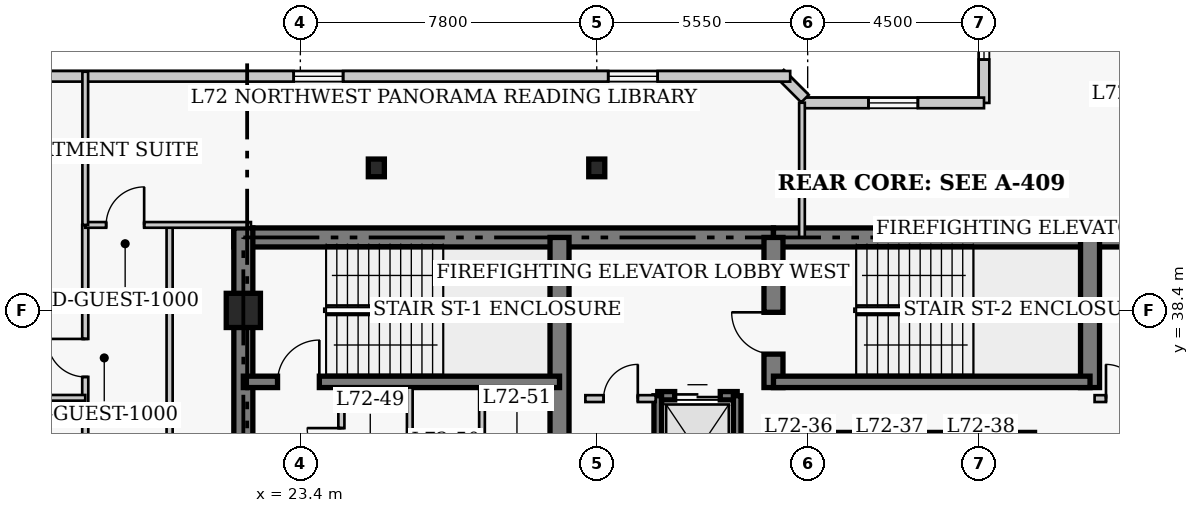
"""IFC4 building model, lengths in metres.
Left out: names, types, materials, properties, quantities, classifications, styles, units other than length and angle.
Written with IfcOpenShell. Run it as: python <this file> out.ifc"""

import sys

from ifc_helpers import new_model, si_unit, direction, frame, frame_2d, origin, origin_2d, place, context, subcontext, project, spatial, rectangle, i_section, extrude, element, fill, save


model = new_model("IFC4")
c1 = context("Model", 3, precision=1e-05, world=origin(), true_north=direction((0.0, 1.0)))
c2 = subcontext(c1, "Body", "Model", "MODEL_VIEW")
j1 = project(units=[si_unit("LENGTHUNIT", "METRE"), si_unit("PLANEANGLEUNIT", "RADIAN")], contexts=[c1])
p1 = place(None, origin())
s1 = spatial("IfcSite", under=j1, at=p1, CompositionType="ELEMENT")
p2 = place(p1, origin())
s2 = spatial("IfcBuilding", under=s1, at=p2, CompositionType="ELEMENT")
p3 = place(p2, frame((0.0, 0.0, 289.4)))
s3 = spatial("IfcBuildingStorey", under=s2, at=p3, CompositionType="ELEMENT", Elevation=289.4)
p4 = place(p3, frame((21.65, 40.32, 0.0), z_axis=(0.0, 0.0, 1.0), x_axis=(1.0, 0.0, 0.0)))
e1 = element("IfcWall", 1, at=p4, inside=s3, PredefinedType="SHEAR", context=c2, shape_type="SweptSolid", body=[
    extrude(rectangle(XDim=14.2, YDim=0.5, at=frame_2d((7.1, 0.0))), origin(), (0.0, 0.0, 1.0), 4.0),
])
p5 = place(p3, frame((35.85, 40.32, 0.0), z_axis=(0.0, 0.0, 1.0), x_axis=(1.0, 0.0, 0.0)))
e2 = element("IfcWall", 2, at=p5, inside=s3, PredefinedType="SHEAR", context=c2, shape_type="SweptSolid", body=[
    extrude(rectangle(XDim=12.6, YDim=0.5, at=frame_2d((6.3, 0.0))), origin(), (0.0, 0.0, 1.0), 4.0),
])
p6 = place(p3, frame((21.9, 27.05, 0.0), z_axis=(0.0, 0.0, 1.0), x_axis=(0.0, 1.0, 0.0)))
e3 = element("IfcWall", 3, at=p6, inside=s3, PredefinedType="SHEAR", context=c2, shape_type="SweptSolid", body=[
    extrude(rectangle(XDim=13.52, YDim=0.5, at=frame_2d((6.76, 0.0))), origin(), (0.0, 0.0, 1.0), 4.0),
])
p7 = place(p3, frame((30.22, 33.0, 0.0), z_axis=(0.0, 0.0, 1.0), x_axis=(0.0, 1.0, 0.0)))
e4 = element("IfcWall", 4, at=p7, inside=s3, PredefinedType="SHEAR", context=c2, shape_type="SweptSolid", body=[
    extrude(rectangle(XDim=7.32, YDim=0.5, at=frame_2d((3.66, 0.0))), origin(), (0.0, 0.0, 1.0), 4.0),
])
p8 = place(p3, frame((35.85, 36.37, 0.0), z_axis=(0.0, 0.0, 1.0), x_axis=(0.0, 1.0, 0.0)))
e5 = element("IfcWall", 5, at=p8, inside=s3, PredefinedType="SHEAR", context=c2, shape_type="SweptSolid", body=[
    extrude(rectangle(XDim=3.95, YDim=0.5, at=frame_2d((1.975, 0.0))), origin(), (0.0, 0.0, 1.0), 4.0),
])
p9 = place(p8, frame((0.88, 0.0, 0.0)))
e6 = element("IfcOpeningElement", 6, at=p9, cuts=e5, PredefinedType="OPENING", context=c2, shape_type="SweptSolid", body=[
    extrude(rectangle(XDim=1.1, YDim=2.15, at=frame_2d((0.55, 1.075))), frame((0.0, 0.26, 0.0), z_axis=(0.0, -1.0, 0.0), x_axis=(1.0, 0.0, 0.0)), (0.0, 0.0, 1.0), 0.52),
])
p10 = place(p3, frame((44.18, 36.37, 0.0), z_axis=(0.0, 0.0, 1.0), x_axis=(0.0, 1.0, 0.0)))
e7 = element("IfcWall", 7, at=p10, inside=s3, PredefinedType="SHEAR", context=c2, shape_type="SweptSolid", body=[
    extrude(rectangle(XDim=3.95, YDim=0.5, at=frame_2d((1.975, 0.0))), origin(), (0.0, 0.0, 1.0), 4.0),
])
p11 = place(p3, frame((21.9, 36.52, 0.0), z_axis=(0.0, 0.0, 1.0), x_axis=(1.0, 0.0, 0.0)))
e8 = element("IfcWall", 8, at=p11, inside=s3, PredefinedType="SHEAR", context=c2, shape_type="SweptSolid", body=[
    extrude(rectangle(XDim=8.32, YDim=0.3, at=frame_2d((4.16, 0.0))), origin(), (0.0, 0.0, 1.0), 4.0),
])
p12 = place(p11, frame((0.9, 0.0, 0.0)))
e9 = element("IfcOpeningElement", 9, at=p12, cuts=e8, PredefinedType="OPENING", context=c2, shape_type="SweptSolid", body=[
    extrude(rectangle(XDim=1.1, YDim=2.15, at=frame_2d((0.55, 1.075))), frame((0.0, 0.16, 0.0), z_axis=(0.0, -1.0, 0.0), x_axis=(1.0, 0.0, 0.0)), (0.0, 0.0, 1.0), 0.32),
])
p13 = place(p3, frame((35.85, 36.52, 0.0), z_axis=(0.0, 0.0, 1.0), x_axis=(1.0, 0.0, 0.0)))
e10 = element("IfcWall", 10, at=p13, inside=s3, PredefinedType="SHEAR", context=c2, shape_type="SweptSolid", body=[
    extrude(rectangle(XDim=8.33, YDim=0.3, at=frame_2d((4.165, 0.0))), origin(), (0.0, 0.0, 1.0), 4.0),
])
p14 = place(p3, frame((21.9, 38.4, 0.0), z_axis=(0.0, 0.0, 1.0), x_axis=(1.0, 0.0, 0.0)))
e11 = element("IfcColumn", 11, at=p14, inside=s3, PredefinedType="COLUMN", context=c2, shape_type="SweptSolid", body=[
    extrude(rectangle(XDim=0.9, YDim=0.9, at=origin_2d()), origin(), (0.0, 0.0, 1.0), 4.0),
])
for number, where, z_axis, x_axis in (
    (12, (25.4, 42.15, 0.0), (0.0, 0.0, 1.0), (1.0, 0.0, 0.0)),
    (13, (31.2, 42.15, 0.0), (0.0, 0.0, 1.0), (1.0, 0.0, 0.0)),
):
    element("IfcColumn", number, at=place(p3, frame(where, z_axis=z_axis, x_axis=x_axis)), inside=s3, PredefinedType="COLUMN", context=c2, shape_type="SweptSolid", body=[
        extrude(i_section(OverallWidth=0.422, OverallDepth=0.465, WebThickness=0.045, FlangeThickness=0.073, FilletRadius=0.017, at=origin_2d()), origin(), (0.0, 0.0, 1.0), 4.0),
    ])
p15 = place(p3, frame((41.39, 47.44, 0.0), z_axis=(0.0, 0.0, 1.0), x_axis=(0.0, -1.0, 0.0)))
e14 = element("IfcWall", 14, at=p15, inside=s3, PredefinedType="SOLIDWALL", context=c2, shape_type="SweptSolid", body=[
    extrude(rectangle(XDim=3.58, YDim=0.28, at=frame_2d((1.79, 0.0))), origin(), (0.0, 0.0, 1.0), 3.76),
])
p16 = place(p15, frame((1.14, 0.0, 0.85)))
e15 = element("IfcOpeningElement", 15, at=p16, cuts=e14, PredefinedType="OPENING", context=c2, shape_type="SweptSolid", body=[
    extrude(rectangle(XDim=1.3, YDim=1.7, at=frame_2d((0.65, 0.85))), frame((0.0, 0.15, 0.0), z_axis=(0.0, -1.0, 0.0), x_axis=(1.0, 0.0, 0.0)), (0.0, 0.0, 1.0), 0.3),
])
p17 = place(p3, frame((41.39, 43.86, 0.0), z_axis=(0.0, 0.0, 1.0), x_axis=(-1.0, 0.0, 0.0)))
e16 = element("IfcWall", 16, at=p17, inside=s3, PredefinedType="SOLIDWALL", context=c2, shape_type="SweptSolid", body=[
    extrude(rectangle(XDim=4.78, YDim=0.28, at=frame_2d((2.39, 0.0))), origin(), (0.0, 0.0, 1.0), 3.76),
])
p18 = place(p17, frame((1.74, 0.0, 0.85)))
e17 = element("IfcOpeningElement", 17, at=p18, cuts=e16, PredefinedType="OPENING", context=c2, shape_type="SweptSolid", body=[
    extrude(rectangle(XDim=1.3, YDim=1.7, at=frame_2d((0.65, 0.85))), frame((0.0, 0.15, 0.0), z_axis=(0.0, -1.0, 0.0), x_axis=(1.0, 0.0, 0.0)), (0.0, 0.0, 1.0), 0.3),
])
p19 = place(p3, frame((36.679, 43.973, 0.0), z_axis=(0.0, 0.0, 1.0), x_axis=(-0.706975312048, 0.707238225886, 0.0)))
e18 = element("IfcWall", 18, at=p19, inside=s3, PredefinedType="SOLIDWALL", context=c2, shape_type="SweptSolid", body=[
    extrude(rectangle(XDim=0.929, YDim=0.28, at=frame_2d((0.464, 0.0))), origin(), (0.0, 0.0, 1.0), 3.76),
])
p20 = place(p3, frame((36.29, 44.56, 0.0), z_axis=(0.0, 0.0, 1.0), x_axis=(-1.0, 0.0, 0.0)))
e19 = element("IfcWall", 19, at=p20, inside=s3, PredefinedType="SOLIDWALL", context=c2, shape_type="SweptSolid", body=[
    extrude(rectangle(XDim=24.83, YDim=0.28, at=frame_2d((12.415, 0.0))), origin(), (0.0, 0.0, 1.0), 3.76),
])
p21 = place(p20, frame((3.488, 0.0, 0.85)))
e20 = element("IfcOpeningElement", 20, at=p21, cuts=e19, PredefinedType="OPENING", context=c2, shape_type="SweptSolid", body=[
    extrude(rectangle(XDim=1.3, YDim=1.7, at=frame_2d((0.65, 0.85))), frame((0.0, 0.15, 0.0), z_axis=(0.0, -1.0, 0.0), x_axis=(1.0, 0.0, 0.0)), (0.0, 0.0, 1.0), 0.3),
])
p22 = place(p20, frame((11.765, 0.0, 0.85)))
e21 = element("IfcOpeningElement", 21, at=p22, cuts=e19, PredefinedType="OPENING", context=c2, shape_type="SweptSolid", body=[
    extrude(rectangle(XDim=1.3, YDim=1.7, at=frame_2d((0.65, 0.85))), frame((0.0, 0.15, 0.0), z_axis=(0.0, -1.0, 0.0), x_axis=(1.0, 0.0, 0.0)), (0.0, 0.0, 1.0), 0.3),
])
p23 = place(p20, frame((20.042, 0.0, 0.85)))
e22 = element("IfcOpeningElement", 22, at=p23, cuts=e19, PredefinedType="OPENING", context=c2, shape_type="SweptSolid", body=[
    extrude(rectangle(XDim=1.3, YDim=1.7, at=frame_2d((0.65, 0.85))), frame((0.0, 0.15, 0.0), z_axis=(0.0, -1.0, 0.0), x_axis=(1.0, 0.0, 0.0)), (0.0, 0.0, 1.0), 0.3),
])
p24 = place(p3, frame((35.68, 35.08, 0.0), z_axis=(0.0, 0.0, 1.0), x_axis=(1.0, 0.0, 0.0)))
e23 = element("IfcWall", 23, at=p24, inside=s3, PredefinedType="SHEAR", context=c2, shape_type="SweptSolid", body=[
    extrude(rectangle(XDim=2.32, YDim=0.22, at=frame_2d((1.16, 0.0))), origin(), (0.0, 0.0, 1.0), 4.0),
])
p25 = place(p3, frame((38.0, 35.08, 0.0), z_axis=(0.0, 0.0, 1.0), x_axis=(1.0, 0.0, 0.0)))
e24 = element("IfcWall", 24, at=p25, inside=s3, PredefinedType="SHEAR", context=c2, shape_type="SweptSolid", body=[
    extrude(rectangle(XDim=2.4, YDim=0.22, at=frame_2d((1.2, 0.0))), origin(), (0.0, 0.0, 1.0), 4.0),
])
p26 = place(p3, frame((40.4, 35.08, 0.0), z_axis=(0.0, 0.0, 1.0), x_axis=(1.0, 0.0, 0.0)))
e25 = element("IfcWall", 25, at=p26, inside=s3, PredefinedType="SHEAR", context=c2, shape_type="SweptSolid", body=[
    extrude(rectangle(XDim=2.32, YDim=0.22, at=frame_2d((1.16, 0.0))), origin(), (0.0, 0.0, 1.0), 4.0),
])
p27 = place(p3, frame((32.805, 36.155, 0.0), z_axis=(0.0, 0.0, 1.0), x_axis=(1.0, 0.0, 0.0)))
e26 = element("IfcWall", 26, at=p27, inside=s3, PredefinedType="SHEAR", context=c2, shape_type="SweptSolid", body=[
    extrude(rectangle(XDim=2.09, YDim=0.22, at=frame_2d((1.045, 0.0))), origin(), (0.0, 0.0, 1.0), 4.0),
])
p28 = place(p27, frame((0.445, 0.0, 0.0)))
e27 = element("IfcOpeningElement", 27, at=p28, cuts=e26, PredefinedType="OPENING", context=c2, shape_type="SweptSolid", body=[
    extrude(rectangle(XDim=1.2, YDim=2.15, at=frame_2d((0.6, 1.075))), frame((0.0, 0.12, 0.0), z_axis=(0.0, -1.0, 0.0), x_axis=(1.0, 0.0, 0.0)), (0.0, 0.0, 1.0), 0.24),
])
for number, where, z_axis, x_axis in (
    (28, (32.805, 33.245, 0.0), (0.0, 0.0, 1.0), (0.0, 1.0, 0.0)),
    (29, (34.895, 33.245, 0.0), (0.0, 0.0, 1.0), (0.0, 1.0, 0.0)),
):
    element("IfcWall", number, at=place(p3, frame(where, z_axis=z_axis, x_axis=x_axis)), inside=s3, PredefinedType="SHEAR", context=c2, shape_type="SweptSolid", body=[
        extrude(rectangle(XDim=2.91, YDim=0.2, at=frame_2d((1.455, 0.0))), origin(), (0.0, 0.0, 1.0), 4.0),
    ])
p29 = place(p3, frame((30.9, 36.08, 0.0), z_axis=(0.0, 0.0, 1.0), x_axis=(1.0, 0.0, 0.0)))
e30 = element("IfcWall", 30, at=p29, inside=s3, PredefinedType="PARTITIONING", context=c2, shape_type="SweptSolid", body=[
    extrude(rectangle(XDim=1.85, YDim=0.18, at=frame_2d((0.925, 0.0))), origin(), (0.0, 0.0, 1.0), 3.76),
])
p30 = place(p29, frame((0.48, 0.0, 0.0)))
e31 = element("IfcOpeningElement", 31, at=p30, cuts=e30, PredefinedType="OPENING", context=c2, shape_type="SweptSolid", body=[
    extrude(rectangle(XDim=0.9, YDim=2.15, at=frame_2d((0.45, 1.075))), frame((0.0, 0.1, 0.0), z_axis=(0.0, -1.0, 0.0), x_axis=(1.0, 0.0, 0.0)), (0.0, 0.0, 1.0), 0.2),
])
p31 = place(p3, frame((44.3, 36.08, 0.0), z_axis=(0.0, 0.0, 1.0), x_axis=(1.0, 0.0, 0.0)))
e32 = element("IfcWall", 32, at=p31, inside=s3, PredefinedType="PARTITIONING", context=c2, shape_type="SweptSolid", body=[
    extrude(rectangle(XDim=1.5, YDim=0.18, at=frame_2d((0.75, 0.0))), origin(), (0.0, 0.0, 1.0), 3.76),
])
p32 = place(p31, frame((0.3, 0.0, 0.0)))
e33 = element("IfcOpeningElement", 33, at=p32, cuts=e32, PredefinedType="OPENING", context=c2, shape_type="SweptSolid", body=[
    extrude(rectangle(XDim=0.9, YDim=2.15, at=frame_2d((0.45, 1.075))), frame((0.0, 0.1, 0.0), z_axis=(0.0, -1.0, 0.0), x_axis=(1.0, 0.0, 0.0)), (0.0, 0.0, 1.0), 0.2),
])
p33 = place(p3, frame((24.48, 32.8, 0.0), z_axis=(0.0, 0.0, 1.0), x_axis=(0.0, 1.0, 0.0)))
e34 = element("IfcWall", 34, at=p33, inside=s3, PredefinedType="PARTITIONING", context=c2, shape_type="SweptSolid", body=[
    extrude(rectangle(XDim=3.57, YDim=0.16, at=frame_2d((1.785, 0.0))), origin(), (0.0, 0.0, 1.0), 3.76),
])
p34 = place(p33, frame((1.604, 0.0, 0.0)))
e35 = element("IfcOpeningElement", 35, at=p34, cuts=e34, PredefinedType="OPENING", context=c2, shape_type="SweptSolid", body=[
    extrude(rectangle(XDim=0.9, YDim=2.1, at=frame_2d((0.45, 1.05))), frame((0.0, 0.09, 0.0), z_axis=(0.0, -1.0, 0.0), x_axis=(1.0, 0.0, 0.0)), (0.0, 0.0, 1.0), 0.18),
])
for number, where, z_axis, x_axis in (
    (36, (26.28, 32.75, 0.0), (0.0, 0.0, 1.0), (0.0, 1.0, 0.0)),
    (37, (28.18, 32.75, 0.0), (0.0, 0.0, 1.0), (0.0, 1.0, 0.0)),
):
    element("IfcWall", number, at=place(p3, frame(where, z_axis=z_axis, x_axis=x_axis)), inside=s3, PredefinedType="PARTITIONING", context=c2, shape_type="SweptSolid", body=[
        extrude(rectangle(XDim=3.62, YDim=0.15, at=frame_2d((1.81, 0.0))), origin(), (0.0, 0.0, 1.0), 3.76),
    ])
p35 = place(p3, frame((17.74, 8.55, 0.0), z_axis=(0.0, 0.0, 1.0), x_axis=(0.0, 1.0, 0.0)))
e38 = element("IfcWall", 38, at=p35, inside=s3, PredefinedType="PARTITIONING", context=c2, shape_type="SweptSolid", body=[
    extrude(rectangle(XDim=32.1, YDim=0.16, at=frame_2d((16.05, 0.0))), origin(), (0.0, 0.0, 1.0), 3.76),
])
p36 = place(p35, frame((5.25, 0.0, 0.0)))
e39 = element("IfcOpeningElement", 39, at=p36, cuts=e38, PredefinedType="OPENING", context=c2, shape_type="SweptSolid", body=[
    extrude(rectangle(XDim=0.95, YDim=2.1, at=frame_2d((0.475, 1.05))), frame((0.0, 0.09, 0.0), z_axis=(0.0, -1.0, 0.0), x_axis=(1.0, 0.0, 0.0)), (0.0, 0.0, 1.0), 0.18),
])
p37 = place(p35, frame((15.375, 0.0, 0.0)))
e40 = element("IfcOpeningElement", 40, at=p37, cuts=e38, PredefinedType="OPENING", context=c2, shape_type="SweptSolid", body=[
    extrude(rectangle(XDim=0.95, YDim=2.1, at=frame_2d((0.475, 1.05))), frame((0.0, 0.09, 0.0), z_axis=(0.0, -1.0, 0.0), x_axis=(1.0, 0.0, 0.0)), (0.0, 0.0, 1.0), 0.18),
])
p38 = place(p35, frame((23.425, 0.0, 0.0)))
e41 = element("IfcOpeningElement", 41, at=p38, cuts=e38, PredefinedType="OPENING", context=c2, shape_type="SweptSolid", body=[
    extrude(rectangle(XDim=0.95, YDim=2.1, at=frame_2d((0.475, 1.05))), frame((0.0, 0.09, 0.0), z_axis=(0.0, -1.0, 0.0), x_axis=(1.0, 0.0, 0.0)), (0.0, 0.0, 1.0), 0.18),
])
p39 = place(p35, frame((28.1, 0.0, 0.0)))
e42 = element("IfcOpeningElement", 42, at=p39, cuts=e38, PredefinedType="OPENING", context=c2, shape_type="SweptSolid", body=[
    extrude(rectangle(XDim=1.0, YDim=2.15, at=frame_2d((0.5, 1.075))), frame((0.0, 0.09, 0.0), z_axis=(0.0, -1.0, 0.0), x_axis=(1.0, 0.0, 0.0)), (0.0, 0.0, 1.0), 0.18),
])
p40 = place(p3, frame((19.96, 35.02, 0.0), z_axis=(0.0, 0.0, 1.0), x_axis=(0.0, 1.0, 0.0)))
e43 = element("IfcWall", 43, at=p40, inside=s3, PredefinedType="PARTITIONING", context=c2, shape_type="SweptSolid", body=[
    extrude(rectangle(XDim=5.63, YDim=0.16, at=frame_2d((2.815, 0.0))), origin(), (0.0, 0.0, 1.0), 3.76),
])
p41 = place(p3, frame((17.74, 40.65, 0.0), z_axis=(0.0, 0.0, 1.0), x_axis=(1.0, 0.0, 0.0)))
e44 = element("IfcWall", 44, at=p41, inside=s3, PredefinedType="PARTITIONING", context=c2, shape_type="SweptSolid", body=[
    extrude(rectangle(XDim=4.36, YDim=0.15, at=frame_2d((2.18, 0.0))), origin(), (0.0, 0.0, 1.0), 3.76),
])
p42 = place(p41, frame((0.55, 0.0, 0.0)))
e45 = element("IfcOpeningElement", 45, at=p42, cuts=e44, PredefinedType="OPENING", context=c2, shape_type="SweptSolid", body=[
    extrude(rectangle(XDim=1.0, YDim=2.15, at=frame_2d((0.5, 1.075))), frame((0.0, 0.085, 0.0), z_axis=(0.0, -1.0, 0.0), x_axis=(1.0, 0.0, 0.0)), (0.0, 0.0, 1.0), 0.17),
])
p43 = place(p3, frame((17.74, 40.65, 0.0), z_axis=(0.0, 0.0, 1.0), x_axis=(0.0, 1.0, 0.0)))
e46 = element("IfcWall", 46, at=p43, inside=s3, PredefinedType="PARTITIONING", context=c2, shape_type="SweptSolid", body=[
    extrude(rectangle(XDim=4.03, YDim=0.15, at=frame_2d((2.015, 0.0))), origin(), (0.0, 0.0, 1.0), 3.76),
])
p44 = place(p3, frame((36.6, 40.32, 0.0), z_axis=(0.0, 0.0, 1.0), x_axis=(0.0, 1.0, 0.0)))
e47 = element("IfcWall", 47, at=p44, inside=s3, PredefinedType="PARTITIONING", context=c2, shape_type="SweptSolid", body=[
    extrude(rectangle(XDim=3.545, YDim=0.15, at=frame_2d((1.772, 0.0))), origin(), (0.0, 0.0, 1.0), 3.76),
])
p45 = place(p3, frame((14.45, 36.1, 0.0), z_axis=(0.0, 0.0, 1.0), x_axis=(1.0, 0.0, 0.0)))
e48 = element("IfcWall", 48, at=p45, inside=s3, PredefinedType="PARTITIONING", context=c2, shape_type="SweptSolid", body=[
    extrude(rectangle(XDim=3.29, YDim=0.15, at=frame_2d((1.645, 0.0))), origin(), (0.0, 0.0, 1.0), 3.76),
])
p46 = place(p16, origin())
e49 = element("IfcWindow", 49, at=p46, inside=s3, PartitioningType="SINGLE_PANEL", PredefinedType="WINDOW", context=c2, shape_type="SweptSolid", body=[
    extrude(rectangle(XDim=1.3, YDim=1.7, at=frame_2d((0.65, 0.85))), frame((0.0, 0.03, 0.0), z_axis=(0.0, -1.0, 0.0), x_axis=(1.0, 0.0, 0.0)), (0.0, 0.0, 1.0), 0.06),
])
fill(e15, e49)
p47 = place(p18, origin())
e50 = element("IfcWindow", 50, at=p47, inside=s3, PartitioningType="SINGLE_PANEL", PredefinedType="WINDOW", context=c2, shape_type="SweptSolid", body=[
    extrude(rectangle(XDim=1.3, YDim=1.7, at=frame_2d((0.65, 0.85))), frame((0.0, 0.03, 0.0), z_axis=(0.0, -1.0, 0.0), x_axis=(1.0, 0.0, 0.0)), (0.0, 0.0, 1.0), 0.06),
])
fill(e17, e50)
p48 = place(p21, origin())
e51 = element("IfcWindow", 51, at=p48, inside=s3, PartitioningType="SINGLE_PANEL", PredefinedType="WINDOW", context=c2, shape_type="SweptSolid", body=[
    extrude(rectangle(XDim=1.3, YDim=1.7, at=frame_2d((0.65, 0.85))), frame((0.0, 0.03, 0.0), z_axis=(0.0, -1.0, 0.0), x_axis=(1.0, 0.0, 0.0)), (0.0, 0.0, 1.0), 0.06),
])
fill(e20, e51)
p49 = place(p22, origin())
e52 = element("IfcWindow", 52, at=p49, inside=s3, PartitioningType="SINGLE_PANEL", PredefinedType="WINDOW", context=c2, shape_type="SweptSolid", body=[
    extrude(rectangle(XDim=1.3, YDim=1.7, at=frame_2d((0.65, 0.85))), frame((0.0, 0.03, 0.0), z_axis=(0.0, -1.0, 0.0), x_axis=(1.0, 0.0, 0.0)), (0.0, 0.0, 1.0), 0.06),
])
fill(e21, e52)
p50 = place(p28, origin())
e53 = element("IfcDoor", 53, at=p50, inside=s3, OperationType="DOUBLE_DOOR_SLIDING", PredefinedType="DOOR", context=c2, shape_type="SweptSolid", body=[
    extrude(rectangle(XDim=1.2, YDim=2.15, at=frame_2d((0.6, 1.075))), frame((0.0, 0.025, 0.0), z_axis=(0.0, -1.0, 0.0), x_axis=(1.0, 0.0, 0.0)), (0.0, 0.0, 1.0), 0.05),
])
fill(e27, e53)
p51 = place(p30, origin())
e54 = element("IfcDoor", 54, at=p51, inside=s3, OperationType="SINGLE_SWING_RIGHT", PredefinedType="DOOR", context=c2, shape_type="SweptSolid", body=[
    extrude(rectangle(XDim=0.9, YDim=2.15, at=frame_2d((0.45, 1.075))), frame((0.0, 0.025, 0.0), z_axis=(0.0, -1.0, 0.0), x_axis=(1.0, 0.0, 0.0)), (0.0, 0.0, 1.0), 0.05),
])
fill(e31, e54)
p52 = place(p32, origin())
e55 = element("IfcDoor", 55, at=p52, inside=s3, OperationType="SINGLE_SWING_LEFT", PredefinedType="DOOR", context=c2, shape_type="SweptSolid", body=[
    extrude(rectangle(XDim=0.9, YDim=2.15, at=frame_2d((0.45, 1.075))), frame((0.0, 0.025, 0.0), z_axis=(0.0, -1.0, 0.0), x_axis=(1.0, 0.0, 0.0)), (0.0, 0.0, 1.0), 0.05),
])
fill(e33, e55)
p53 = place(p34, origin())
e56 = element("IfcDoor", 56, at=p53, inside=s3, OperationType="SINGLE_SWING_RIGHT", PredefinedType="DOOR", context=c2, shape_type="SweptSolid", body=[
    extrude(rectangle(XDim=0.9, YDim=2.1, at=frame_2d((0.45, 1.05))), frame((0.0, 0.025, 0.0), z_axis=(0.0, -1.0, 0.0), x_axis=(1.0, 0.0, 0.0)), (0.0, 0.0, 1.0), 0.05),
])
fill(e35, e56)
p54 = place(p42, origin())
e57 = element("IfcDoor", 57, at=p54, inside=s3, OperationType="SINGLE_SWING_RIGHT", PredefinedType="DOOR", context=c2, shape_type="SweptSolid", body=[
    extrude(rectangle(XDim=1.0, YDim=2.15, at=frame_2d((0.5, 1.075))), frame((0.0, 0.025, 0.0), z_axis=(0.0, -1.0, 0.0), x_axis=(1.0, 0.0, 0.0)), (0.0, 0.0, 1.0), 0.05),
])
fill(e45, e57)
p55 = place(p39, origin())
e58 = element("IfcDoor", 58, at=p55, inside=s3, OperationType="SINGLE_SWING_RIGHT", PredefinedType="DOOR", context=c2, shape_type="SweptSolid", body=[
    extrude(rectangle(XDim=1.0, YDim=2.15, at=frame_2d((0.5, 1.075))), frame((0.0, 0.025, 0.0), z_axis=(0.0, -1.0, 0.0), x_axis=(1.0, 0.0, 0.0)), (0.0, 0.0, 1.0), 0.05),
])
fill(e42, e58)
p56 = place(p12, origin())
e59 = element("IfcDoor", 59, at=p56, inside=s3, OperationType="SINGLE_SWING_RIGHT", PredefinedType="DOOR", context=c2, shape_type="SweptSolid", body=[
    extrude(rectangle(XDim=1.1, YDim=2.15, at=frame_2d((0.55, 1.075))), frame((0.0, 0.025, 0.0), z_axis=(0.0, -1.0, 0.0), x_axis=(1.0, 0.0, 0.0)), (0.0, 0.0, 1.0), 0.05),
])
fill(e9, e59)
p57 = place(p9, origin())
e60 = element("IfcDoor", 60, at=p57, inside=s3, OperationType="SINGLE_SWING_RIGHT", PredefinedType="DOOR", context=c2, shape_type="SweptSolid", body=[
    extrude(rectangle(XDim=1.1, YDim=2.15, at=frame_2d((0.55, 1.075))), frame((0.0, 0.025, 0.0), z_axis=(0.0, -1.0, 0.0), x_axis=(1.0, 0.0, 0.0)), (0.0, 0.0, 1.0), 0.05),
])
fill(e6, e60)
save(model, sys.argv[1])
